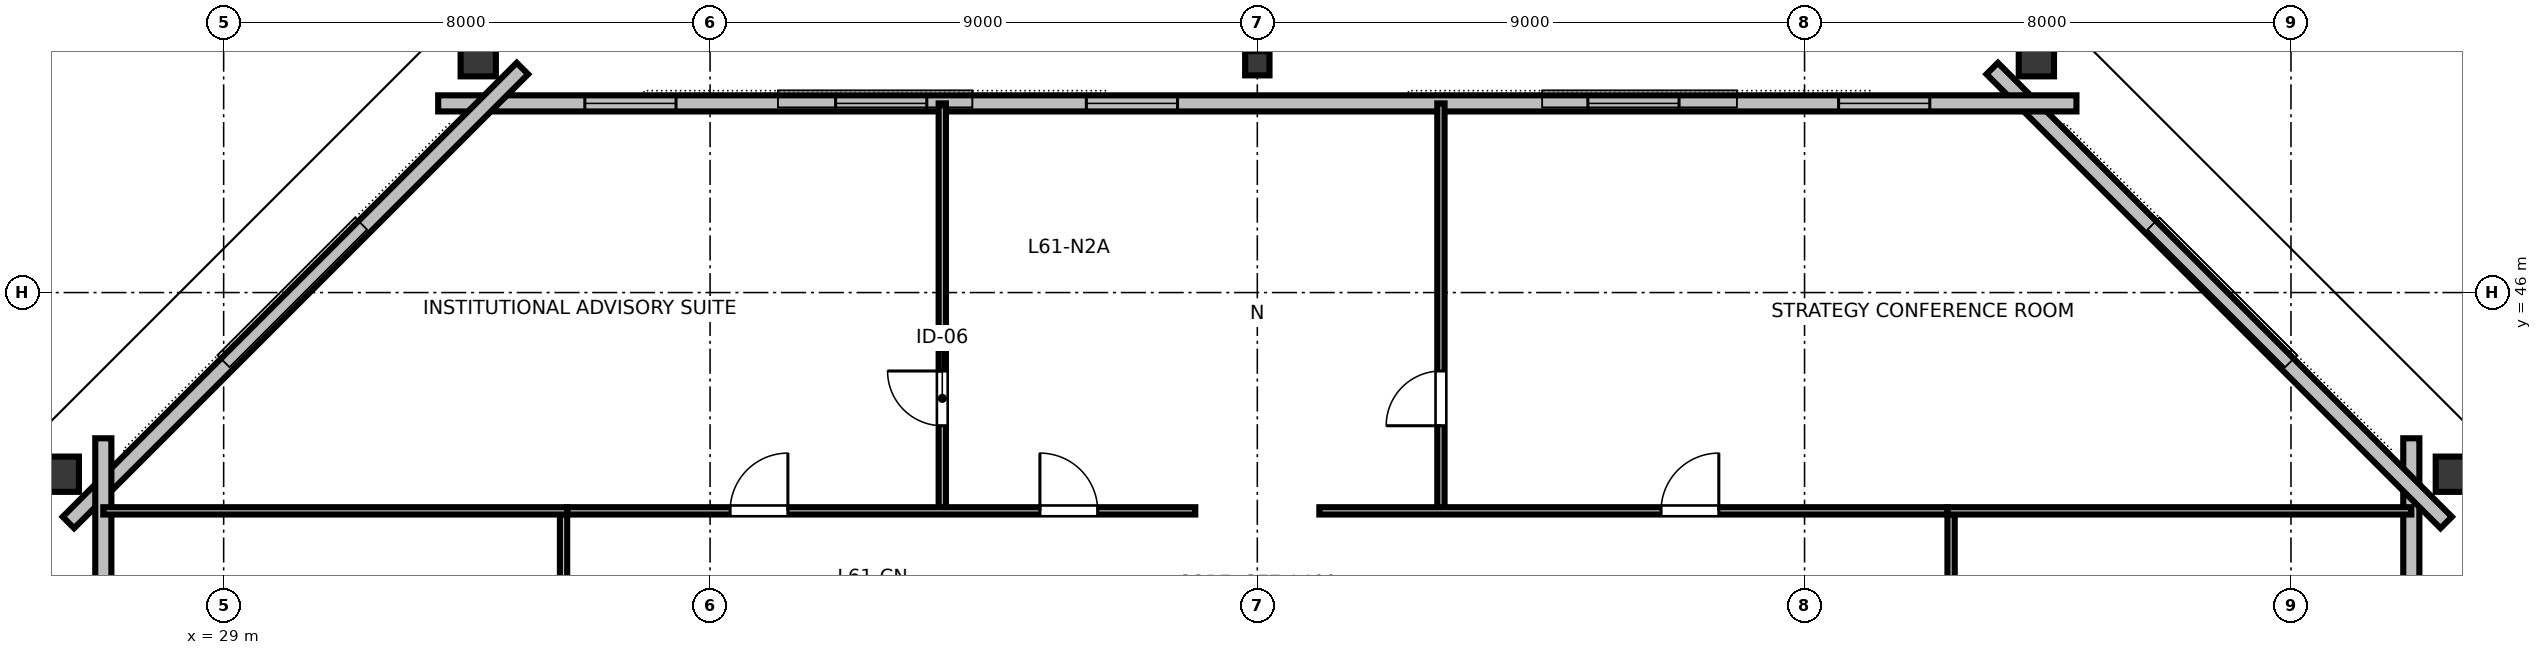
"""IFC4 building model, lengths in metres.
Left out: names, types, materials, properties, quantities, classifications, styles, units other than length and angle.
Written with IfcOpenShell. Run it as: python <this file> out.ifc"""

import sys

from ifc_helpers import new_model, si_unit, direction, frame, frame_2d, origin, origin_2d, place, context, subcontext, project, spatial, rectangle, hollow_rectangle, i_section, extrude, element, fill, save


model = new_model("IFC4")
c1 = context("Model", 3, precision=1e-05, world=origin(), true_north=direction((0.0, 1.0)))
c2 = subcontext(c1, "Body", "Model", "MODEL_VIEW")
j1 = project(units=[si_unit("LENGTHUNIT", "METRE"), si_unit("PLANEANGLEUNIT", "RADIAN")], contexts=[c1])
p1 = place(None, origin())
s1 = spatial("IfcSite", under=j1, at=p1, CompositionType="ELEMENT")
p2 = place(p1, origin())
s2 = spatial("IfcBuilding", under=s1, at=p2, CompositionType="ELEMENT")
p3 = place(p2, frame((0.0, 0.0, 231.0)))
s3 = spatial("IfcBuildingStorey", under=s2, at=p3, CompositionType="ELEMENT", Elevation=231.0)
p4 = place(p3, frame((65.73, 43.013, 0.0), z_axis=(-0.062492571187, -0.054773773796, 0.996541274735), x_axis=(0.749422115547, 0.656856913627, 0.083099264433)))
e1 = element("IfcColumn", 1, at=p4, inside=s3, PredefinedType="COLUMN", context=c2, shape_type="SweptSolid", body=[
    extrude(hollow_rectangle(XDim=0.58, YDim=0.7, WallThickness=0.032, at=origin_2d()), origin(), (0.0, 0.0, 1.0), 3.29),
])
p5 = place(p3, frame((58.813, 49.906, 0.0), z_axis=(-0.072351164075, -0.044894824887, 0.996368287209), x_axis=(0.527254388164, -0.849707485057, 0.0)))
e2 = element("IfcColumn", 2, at=p5, inside=s3, PredefinedType="COLUMN", context=c2, shape_type="SweptSolid", body=[
    extrude(hollow_rectangle(XDim=0.58, YDim=0.7, WallThickness=0.032, at=origin_2d()), origin(), (0.0, 0.0, 1.0), 3.29),
])
p6 = place(p3, frame((46.0, 49.771, 0.0), z_axis=(0.0, -0.04434450837, 0.999016298454), x_axis=(1.0, 0.0, 0.0)))
e3 = element("IfcColumn", 3, at=p6, inside=s3, PredefinedType="COLUMN", context=c2, shape_type="SweptSolid", body=[
    extrude(i_section(OverallWidth=0.401, OverallDepth=0.399, WebThickness=0.025, FlangeThickness=0.04, FilletRadius=0.025, at=origin_2d()), origin(), (0.0, 0.0, 1.0), 3.281),
])
p7 = place(p3, frame((33.187, 49.906, 0.0), z_axis=(0.072351164075, -0.044894824887, 0.996368287209), x_axis=(0.527254388164, 0.849707485057, 0.0)))
e4 = element("IfcColumn", 4, at=p7, inside=s3, PredefinedType="COLUMN", context=c2, shape_type="SweptSolid", body=[
    extrude(hollow_rectangle(XDim=0.58, YDim=0.7, WallThickness=0.032, at=origin_2d()), origin(), (0.0, 0.0, 1.0), 3.29),
])
p8 = place(p3, frame((26.27, 43.013, 0.0), z_axis=(0.062492571187, -0.054773773796, 0.996541274735), x_axis=(-0.749422115547, 0.656856913627, 0.083099264433)))
e5 = element("IfcColumn", 5, at=p8, inside=s3, PredefinedType="COLUMN", context=c2, shape_type="SweptSolid", body=[
    extrude(hollow_rectangle(XDim=0.58, YDim=0.7, WallThickness=0.032, at=origin_2d()), origin(), (0.0, 0.0, 1.0), 3.29),
])
p9 = place(p3, frame((64.979, 20.396, 0.0), z_axis=(0.0, 0.0, 1.0), x_axis=(0.0, 1.0, 0.0)))
e6 = element("IfcWall", 6, at=p9, inside=s3, PredefinedType="STANDARD", context=c2, shape_type="SweptSolid", body=[
    extrude(rectangle(XDim=23.207, YDim=0.265, at=frame_2d((11.604, 0.0))), origin(), (0.0, 0.0, 1.0), 3.28),
])
p10 = place(p9, frame((2.451, 0.0, 0.85)))
e7 = element("IfcOpeningElement", 7, at=p10, cuts=e6, PredefinedType="OPENING", context=c2, shape_type="SweptSolid", body=[
    extrude(rectangle(XDim=1.5, YDim=1.85, at=frame_2d((0.75, 0.925))), frame((0.0, 0.142, 0.0), z_axis=(0.0, -1.0, 0.0), x_axis=(1.0, 0.0, 0.0)), (0.0, 0.0, 1.0), 0.285),
])
p11 = place(p9, frame((15.055, 0.0, 0.85)))
e8 = element("IfcOpeningElement", 8, at=p11, cuts=e6, PredefinedType="OPENING", context=c2, shape_type="SweptSolid", body=[
    extrude(rectangle(XDim=1.5, YDim=1.85, at=frame_2d((0.75, 0.925))), frame((0.0, 0.142, 0.0), z_axis=(0.0, -1.0, 0.0), x_axis=(1.0, 0.0, 0.0)), (0.0, 0.0, 1.0), 0.285),
])
p12 = place(p9, frame((19.257, 0.0, 0.85)))
e9 = element("IfcOpeningElement", 9, at=p12, cuts=e6, PredefinedType="OPENING", context=c2, shape_type="SweptSolid", body=[
    extrude(rectangle(XDim=1.5, YDim=1.85, at=frame_2d((0.75, 0.925))), frame((0.0, 0.142, 0.0), z_axis=(0.0, -1.0, 0.0), x_axis=(1.0, 0.0, 0.0)), (0.0, 0.0, 1.0), 0.285),
])
p13 = place(p3, frame((65.553, 42.218, 0.0), z_axis=(0.0, 0.0, 1.0), x_axis=(-0.707106781187, 0.707106781187, 0.0)))
e10 = element("IfcWall", 10, at=p13, inside=s3, PredefinedType="STANDARD", context=c2, shape_type="SweptSolid", body=[
    extrude(rectangle(XDim=10.56, YDim=0.265, at=frame_2d((5.28, 0.0))), origin(), (0.0, 0.0, 1.0), 2.343),
])
p14 = place(p3, frame((59.472, 49.111, 0.0), z_axis=(0.0, 0.0, 1.0), x_axis=(-1.0, 0.0, 0.0)))
e11 = element("IfcWall", 11, at=p14, inside=s3, PredefinedType="STANDARD", context=c2, shape_type="SweptSolid", body=[
    extrude(rectangle(XDim=26.943, YDim=0.265, at=frame_2d((13.472, 0.0))), origin(), (0.0, 0.0, 1.0), 3.28),
])
p15 = place(p14, frame((2.412, 0.0, 0.85)))
e12 = element("IfcOpeningElement", 12, at=p15, cuts=e11, PredefinedType="OPENING", context=c2, shape_type="SweptSolid", body=[
    extrude(rectangle(XDim=1.5, YDim=1.85, at=frame_2d((0.75, 0.925))), frame((0.0, 0.142, 0.0), z_axis=(0.0, -1.0, 0.0), x_axis=(1.0, 0.0, 0.0)), (0.0, 0.0, 1.0), 0.285),
])
p16 = place(p14, frame((6.536, 0.0, 0.85)))
e13 = element("IfcOpeningElement", 13, at=p16, cuts=e11, PredefinedType="OPENING", context=c2, shape_type="SweptSolid", body=[
    extrude(rectangle(XDim=1.5, YDim=1.85, at=frame_2d((0.75, 0.925))), frame((0.0, 0.142, 0.0), z_axis=(0.0, -1.0, 0.0), x_axis=(1.0, 0.0, 0.0)), (0.0, 0.0, 1.0), 0.285),
])
p17 = place(p14, frame((14.784, 0.0, 0.85)))
e14 = element("IfcOpeningElement", 14, at=p17, cuts=e11, PredefinedType="OPENING", context=c2, shape_type="SweptSolid", body=[
    extrude(rectangle(XDim=1.5, YDim=1.85, at=frame_2d((0.75, 0.925))), frame((0.0, 0.142, 0.0), z_axis=(0.0, -1.0, 0.0), x_axis=(1.0, 0.0, 0.0)), (0.0, 0.0, 1.0), 0.285),
])
p18 = place(p14, frame((18.908, 0.0, 0.85)))
e15 = element("IfcOpeningElement", 15, at=p18, cuts=e11, PredefinedType="OPENING", context=c2, shape_type="SweptSolid", body=[
    extrude(rectangle(XDim=1.5, YDim=1.85, at=frame_2d((0.75, 0.925))), frame((0.0, 0.142, 0.0), z_axis=(0.0, -1.0, 0.0), x_axis=(1.0, 0.0, 0.0)), (0.0, 0.0, 1.0), 0.285),
])
p19 = place(p14, frame((23.031, 0.0, 0.85)))
e16 = element("IfcOpeningElement", 16, at=p19, cuts=e11, PredefinedType="OPENING", context=c2, shape_type="SweptSolid", body=[
    extrude(rectangle(XDim=1.5, YDim=1.85, at=frame_2d((0.75, 0.925))), frame((0.0, 0.142, 0.0), z_axis=(0.0, -1.0, 0.0), x_axis=(1.0, 0.0, 0.0)), (0.0, 0.0, 1.0), 0.285),
])
p20 = place(p3, frame((33.914, 49.685, 0.0), z_axis=(0.0, 0.0, 1.0), x_axis=(-0.707106781187, -0.707106781187, 0.0)))
e17 = element("IfcWall", 17, at=p20, inside=s3, PredefinedType="STANDARD", context=c2, shape_type="SweptSolid", body=[
    extrude(rectangle(XDim=10.56, YDim=0.265, at=frame_2d((5.28, 0.0))), origin(), (0.0, 0.0, 1.0), 2.343),
])
p21 = place(p3, frame((27.021, 43.604, 0.0), z_axis=(0.0, 0.0, 1.0), x_axis=(0.0, -1.0, 0.0)))
e18 = element("IfcWall", 18, at=p21, inside=s3, PredefinedType="STANDARD", context=c2, shape_type="SweptSolid", body=[
    extrude(rectangle(XDim=23.207, YDim=0.265, at=frame_2d((11.604, 0.0))), origin(), (0.0, 0.0, 1.0), 3.28),
])
p22 = place(p21, frame((2.451, 0.0, 0.85)))
e19 = element("IfcOpeningElement", 19, at=p22, cuts=e18, PredefinedType="OPENING", context=c2, shape_type="SweptSolid", body=[
    extrude(rectangle(XDim=1.5, YDim=1.85, at=frame_2d((0.75, 0.925))), frame((0.0, 0.142, 0.0), z_axis=(0.0, -1.0, 0.0), x_axis=(1.0, 0.0, 0.0)), (0.0, 0.0, 1.0), 0.285),
])
p23 = place(p21, frame((6.652, 0.0, 0.85)))
e20 = element("IfcOpeningElement", 20, at=p23, cuts=e18, PredefinedType="OPENING", context=c2, shape_type="SweptSolid", body=[
    extrude(rectangle(XDim=1.5, YDim=1.85, at=frame_2d((0.75, 0.925))), frame((0.0, 0.142, 0.0), z_axis=(0.0, -1.0, 0.0), x_axis=(1.0, 0.0, 0.0)), (0.0, 0.0, 1.0), 0.285),
])
p24 = place(p21, frame((15.055, 0.0, 0.85)))
e21 = element("IfcOpeningElement", 21, at=p24, cuts=e18, PredefinedType="OPENING", context=c2, shape_type="SweptSolid", body=[
    extrude(rectangle(XDim=1.5, YDim=1.85, at=frame_2d((0.75, 0.925))), frame((0.0, 0.142, 0.0), z_axis=(0.0, -1.0, 0.0), x_axis=(1.0, 0.0, 0.0)), (0.0, 0.0, 1.0), 0.285),
])
p25 = place(p21, frame((19.257, 0.0, 0.85)))
e22 = element("IfcOpeningElement", 22, at=p25, cuts=e18, PredefinedType="OPENING", context=c2, shape_type="SweptSolid", body=[
    extrude(rectangle(XDim=1.5, YDim=1.85, at=frame_2d((0.75, 0.925))), frame((0.0, 0.142, 0.0), z_axis=(0.0, -1.0, 0.0), x_axis=(1.0, 0.0, 0.0)), (0.0, 0.0, 1.0), 0.285),
])
p26 = place(p3, frame((40.819, 42.41, 0.0), z_axis=(0.0, 0.0, 1.0), x_axis=(0.0, 1.0, 0.0)))
e23 = element("IfcWall", 23, at=p26, inside=s3, PredefinedType="PARTITIONING", context=c2, shape_type="SweptSolid", body=[
    extrude(rectangle(XDim=6.701, YDim=0.12, at=frame_2d((3.351, 0.0))), origin(), (0.0, 0.0, 1.0), 2.56),
])
p27 = place(p26, frame((1.4, 0.0, 0.0)))
e24 = element("IfcOpeningElement", 24, at=p27, cuts=e23, PredefinedType="OPENING", context=c2, shape_type="SweptSolid", body=[
    extrude(rectangle(XDim=0.9, YDim=2.15, at=frame_2d((0.45, 1.075))), frame((0.0, 0.07, 0.0), z_axis=(0.0, -1.0, 0.0), x_axis=(1.0, 0.0, 0.0)), (0.0, 0.0, 1.0), 0.14),
])
p28 = place(p3, frame((49.02, 42.41, 0.0), z_axis=(0.0, 0.0, 1.0), x_axis=(0.0, 1.0, 0.0)))
e25 = element("IfcWall", 25, at=p28, inside=s3, PredefinedType="PARTITIONING", context=c2, shape_type="SweptSolid", body=[
    extrude(rectangle(XDim=6.701, YDim=0.12, at=frame_2d((3.351, 0.0))), origin(), (0.0, 0.0, 1.0), 2.56),
])
p29 = place(p28, frame((1.4, 0.0, 0.0)))
e26 = element("IfcOpeningElement", 26, at=p29, cuts=e25, PredefinedType="OPENING", context=c2, shape_type="SweptSolid", body=[
    extrude(rectangle(XDim=0.9, YDim=2.15, at=frame_2d((0.45, 1.075))), frame((0.0, 0.07, 0.0), z_axis=(0.0, -1.0, 0.0), x_axis=(1.0, 0.0, 0.0)), (0.0, 0.0, 1.0), 0.14),
])
p30 = place(p3, frame((34.65, 42.41, 0.0), z_axis=(0.0, 0.0, 1.0), x_axis=(1.0, 0.0, 0.0)))
e27 = element("IfcWall", 27, at=p30, inside=s3, PredefinedType="PARTITIONING", context=c2, shape_type="SweptSolid", body=[
    extrude(rectangle(XDim=10.33, YDim=0.12, at=frame_2d((5.165, 0.0))), origin(), (0.0, 0.0, 1.0), 2.56),
])
p31 = place(p30, frame((2.679, 0.0, 0.0)))
e28 = element("IfcOpeningElement", 28, at=p31, cuts=e27, PredefinedType="OPENING", context=c2, shape_type="SweptSolid", body=[
    extrude(rectangle(XDim=0.95, YDim=2.15, at=frame_2d((0.475, 1.075))), frame((0.0, 0.07, 0.0), z_axis=(0.0, -1.0, 0.0), x_axis=(1.0, 0.0, 0.0)), (0.0, 0.0, 1.0), 0.14),
])
p32 = place(p30, frame((7.774, 0.0, 0.0)))
e29 = element("IfcOpeningElement", 29, at=p32, cuts=e27, PredefinedType="OPENING", context=c2, shape_type="SweptSolid", body=[
    extrude(rectangle(XDim=0.95, YDim=2.15, at=frame_2d((0.475, 1.075))), frame((0.0, 0.07, 0.0), z_axis=(0.0, -1.0, 0.0), x_axis=(1.0, 0.0, 0.0)), (0.0, 0.0, 1.0), 0.14),
])
p33 = place(p3, frame((47.02, 42.41, 0.0), z_axis=(0.0, 0.0, 1.0), x_axis=(1.0, 0.0, 0.0)))
e30 = element("IfcWall", 30, at=p33, inside=s3, PredefinedType="PARTITIONING", context=c2, shape_type="SweptSolid", body=[
    extrude(rectangle(XDim=10.33, YDim=0.12, at=frame_2d((5.165, 0.0))), origin(), (0.0, 0.0, 1.0), 2.56),
])
p34 = place(p33, frame((5.62, 0.0, 0.0)))
e31 = element("IfcOpeningElement", 31, at=p34, cuts=e30, PredefinedType="OPENING", context=c2, shape_type="SweptSolid", body=[
    extrude(rectangle(XDim=0.95, YDim=2.15, at=frame_2d((0.475, 1.075))), frame((0.0, 0.07, 0.0), z_axis=(0.0, -1.0, 0.0), x_axis=(1.0, 0.0, 0.0)), (0.0, 0.0, 1.0), 0.14),
])
p35 = place(p3, frame((34.59, 21.65, 0.0), z_axis=(0.0, 0.0, 1.0), x_axis=(0.0, 1.0, 0.0)))
e32 = element("IfcWall", 32, at=p35, inside=s3, PredefinedType="PARTITIONING", context=c2, shape_type="SweptSolid", body=[
    extrude(rectangle(XDim=20.7, YDim=0.12, at=frame_2d((10.35, 0.0))), origin(), (0.0, 0.0, 1.0), 2.56),
])
p36 = place(p35, frame((3.682, 0.0, 0.0)))
e33 = element("IfcOpeningElement", 33, at=p36, cuts=e32, PredefinedType="OPENING", context=c2, shape_type="SweptSolid", body=[
    extrude(rectangle(XDim=0.95, YDim=2.15, at=frame_2d((0.475, 1.075))), frame((0.0, 0.07, 0.0), z_axis=(0.0, -1.0, 0.0), x_axis=(1.0, 0.0, 0.0)), (0.0, 0.0, 1.0), 0.14),
])
p37 = place(p35, frame((13.832, 0.0, 0.0)))
e34 = element("IfcOpeningElement", 34, at=p37, cuts=e32, PredefinedType="OPENING", context=c2, shape_type="SweptSolid", body=[
    extrude(rectangle(XDim=0.95, YDim=2.15, at=frame_2d((0.475, 1.075))), frame((0.0, 0.07, 0.0), z_axis=(0.0, -1.0, 0.0), x_axis=(1.0, 0.0, 0.0)), (0.0, 0.0, 1.0), 0.14),
])
p38 = place(p3, frame((57.41, 21.65, 0.0), z_axis=(0.0, 0.0, 1.0), x_axis=(0.0, 1.0, 0.0)))
e35 = element("IfcWall", 35, at=p38, inside=s3, PredefinedType="PARTITIONING", context=c2, shape_type="SweptSolid", body=[
    extrude(rectangle(XDim=20.7, YDim=0.12, at=frame_2d((10.35, 0.0))), origin(), (0.0, 0.0, 1.0), 2.56),
])
p39 = place(p38, frame((2.799, 0.0, 0.0)))
e36 = element("IfcOpeningElement", 36, at=p39, cuts=e35, PredefinedType="OPENING", context=c2, shape_type="SweptSolid", body=[
    extrude(rectangle(XDim=0.95, YDim=2.15, at=frame_2d((0.475, 1.075))), frame((0.0, 0.07, 0.0), z_axis=(0.0, -1.0, 0.0), x_axis=(1.0, 0.0, 0.0)), (0.0, 0.0, 1.0), 0.14),
])
p40 = place(p38, frame((8.187, 0.0, 0.0)))
e37 = element("IfcOpeningElement", 37, at=p40, cuts=e35, PredefinedType="OPENING", context=c2, shape_type="SweptSolid", body=[
    extrude(rectangle(XDim=0.95, YDim=2.15, at=frame_2d((0.475, 1.075))), frame((0.0, 0.07, 0.0), z_axis=(0.0, -1.0, 0.0), x_axis=(1.0, 0.0, 0.0)), (0.0, 0.0, 1.0), 0.14),
])
p41 = place(p38, frame((15.263, 0.0, 0.0)))
e38 = element("IfcOpeningElement", 38, at=p41, cuts=e35, PredefinedType="OPENING", context=c2, shape_type="SweptSolid", body=[
    extrude(rectangle(XDim=0.95, YDim=2.15, at=frame_2d((0.475, 1.075))), frame((0.0, 0.07, 0.0), z_axis=(0.0, -1.0, 0.0), x_axis=(1.0, 0.0, 0.0)), (0.0, 0.0, 1.0), 0.14),
])
for number, where, z_axis, x_axis in (
    (39, (34.65, 42.41, 0.0), (0.0, 0.0, 1.0), (-1.0, 0.0, 0.0)),
    (40, (57.35, 42.41, 0.0), (0.0, 0.0, 1.0), (1.0, 0.0, 0.0)),
):
    element("IfcWall", number, at=place(p3, frame(where, z_axis=z_axis, x_axis=x_axis)), inside=s3, PredefinedType="PARTITIONING", context=c2, shape_type="SweptSolid", body=[
        extrude(rectangle(XDim=7.629, YDim=0.12, at=frame_2d((3.814, 0.0))), origin(), (0.0, 0.0, 1.0), 2.56),
    ])
p42 = place(p15, origin())
e41 = element("IfcWindow", 41, at=p42, inside=s3, PartitioningType="SINGLE_PANEL", PredefinedType="WINDOW", context=c2, shape_type="SweptSolid", body=[
    extrude(rectangle(XDim=1.5, YDim=1.85, at=frame_2d((0.75, 0.925))), frame((0.0, 0.03, 0.0), z_axis=(0.0, -1.0, 0.0), x_axis=(1.0, 0.0, 0.0)), (0.0, 0.0, 1.0), 0.06),
])
fill(e12, e41)
p43 = place(p16, origin())
e42 = element("IfcWindow", 42, at=p43, inside=s3, PartitioningType="SINGLE_PANEL", PredefinedType="WINDOW", context=c2, shape_type="SweptSolid", body=[
    extrude(rectangle(XDim=1.5, YDim=1.85, at=frame_2d((0.75, 0.925))), frame((0.0, 0.03, 0.0), z_axis=(0.0, -1.0, 0.0), x_axis=(1.0, 0.0, 0.0)), (0.0, 0.0, 1.0), 0.06),
])
fill(e13, e42)
p44 = place(p17, origin())
e43 = element("IfcWindow", 43, at=p44, inside=s3, PartitioningType="SINGLE_PANEL", PredefinedType="WINDOW", context=c2, shape_type="SweptSolid", body=[
    extrude(rectangle(XDim=1.5, YDim=1.85, at=frame_2d((0.75, 0.925))), frame((0.0, 0.03, 0.0), z_axis=(0.0, -1.0, 0.0), x_axis=(1.0, 0.0, 0.0)), (0.0, 0.0, 1.0), 0.06),
])
fill(e14, e43)
p45 = place(p18, origin())
e44 = element("IfcWindow", 44, at=p45, inside=s3, PartitioningType="SINGLE_PANEL", PredefinedType="WINDOW", context=c2, shape_type="SweptSolid", body=[
    extrude(rectangle(XDim=1.5, YDim=1.85, at=frame_2d((0.75, 0.925))), frame((0.0, 0.03, 0.0), z_axis=(0.0, -1.0, 0.0), x_axis=(1.0, 0.0, 0.0)), (0.0, 0.0, 1.0), 0.06),
])
fill(e15, e44)
p46 = place(p19, origin())
e45 = element("IfcWindow", 45, at=p46, inside=s3, PartitioningType="SINGLE_PANEL", PredefinedType="WINDOW", context=c2, shape_type="SweptSolid", body=[
    extrude(rectangle(XDim=1.5, YDim=1.85, at=frame_2d((0.75, 0.925))), frame((0.0, 0.03, 0.0), z_axis=(0.0, -1.0, 0.0), x_axis=(1.0, 0.0, 0.0)), (0.0, 0.0, 1.0), 0.06),
])
fill(e16, e45)
p47 = place(p27, origin())
e46 = element("IfcDoor", 46, at=p47, inside=s3, OperationType="SINGLE_SWING_RIGHT", PredefinedType="DOOR", context=c2, shape_type="SweptSolid", body=[
    extrude(rectangle(XDim=0.9, YDim=2.15, at=frame_2d((0.45, 1.075))), frame((0.0, 0.025, 0.0), z_axis=(0.0, -1.0, 0.0), x_axis=(1.0, 0.0, 0.0)), (0.0, 0.0, 1.0), 0.05),
])
fill(e24, e46)
p48 = place(p29, origin())
e47 = element("IfcDoor", 47, at=p48, inside=s3, OperationType="SINGLE_SWING_LEFT", PredefinedType="DOOR", context=c2, shape_type="SweptSolid", body=[
    extrude(rectangle(XDim=0.9, YDim=2.15, at=frame_2d((0.45, 1.075))), frame((0.0, 0.025, 0.0), z_axis=(0.0, -1.0, 0.0), x_axis=(1.0, 0.0, 0.0)), (0.0, 0.0, 1.0), 0.05),
])
fill(e26, e47)
p49 = place(p31, origin())
e48 = element("IfcDoor", 48, at=p49, inside=s3, OperationType="SINGLE_SWING_RIGHT", PredefinedType="DOOR", context=c2, shape_type="SweptSolid", body=[
    extrude(rectangle(XDim=0.95, YDim=2.15, at=frame_2d((0.475, 1.075))), frame((0.0, 0.025, 0.0), z_axis=(0.0, -1.0, 0.0), x_axis=(1.0, 0.0, 0.0)), (0.0, 0.0, 1.0), 0.05),
])
fill(e28, e48)
p50 = place(p32, origin())
e49 = element("IfcDoor", 49, at=p50, inside=s3, OperationType="SINGLE_SWING_LEFT", PredefinedType="DOOR", context=c2, shape_type="SweptSolid", body=[
    extrude(rectangle(XDim=0.95, YDim=2.15, at=frame_2d((0.475, 1.075))), frame((0.0, 0.025, 0.0), z_axis=(0.0, -1.0, 0.0), x_axis=(1.0, 0.0, 0.0)), (0.0, 0.0, 1.0), 0.05),
])
fill(e29, e49)
p51 = place(p34, origin())
e50 = element("IfcDoor", 50, at=p51, inside=s3, OperationType="SINGLE_SWING_RIGHT", PredefinedType="DOOR", context=c2, shape_type="SweptSolid", body=[
    extrude(rectangle(XDim=0.95, YDim=2.15, at=frame_2d((0.475, 1.075))), frame((0.0, 0.025, 0.0), z_axis=(0.0, -1.0, 0.0), x_axis=(1.0, 0.0, 0.0)), (0.0, 0.0, 1.0), 0.05),
])
fill(e31, e50)
save(model, sys.argv[1])
